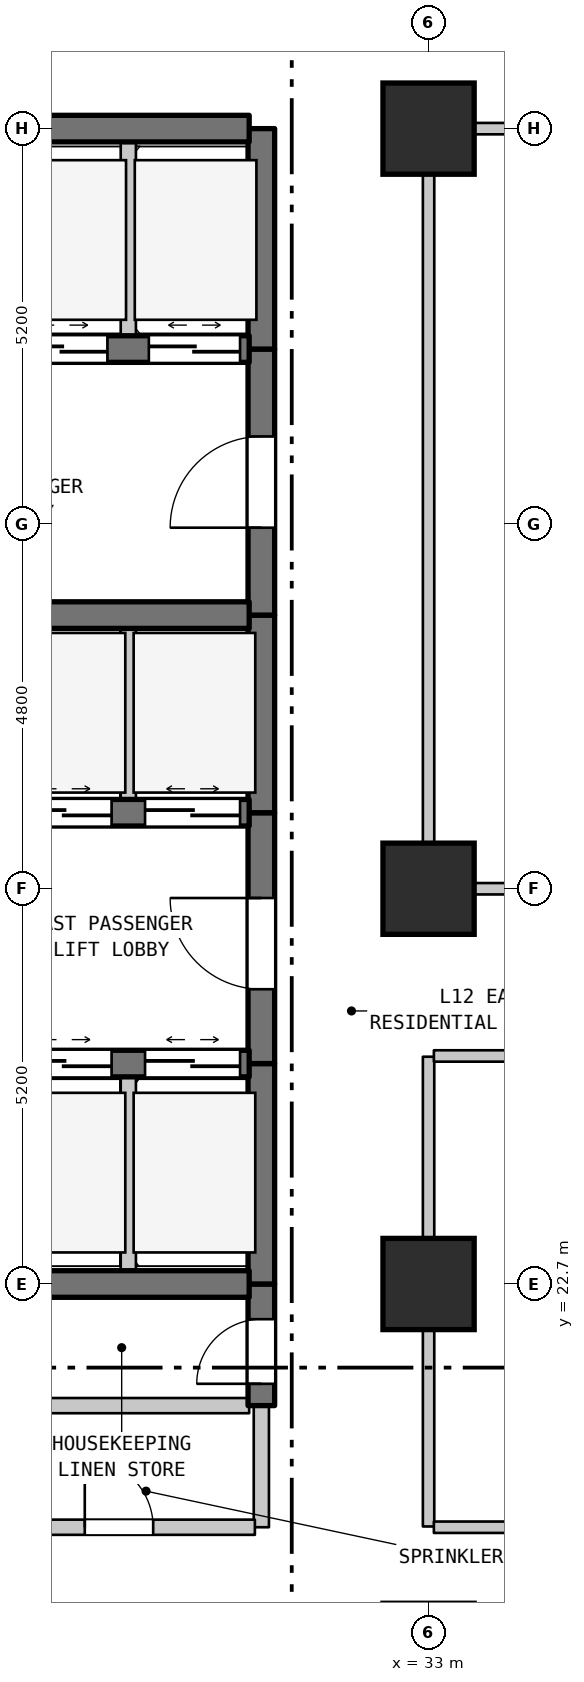
"""IFC4 building model, lengths in metres.
Left out: names, types, materials, properties, quantities, classifications, styles, units other than length and angle.
Written with IfcOpenShell. Run it as: python <this file> out.ifc"""

import sys

from ifc_helpers import new_model, si_unit, direction, frame, frame_2d, origin, origin_2d, place, context, subcontext, project, spatial, rectangle, extrude, element, fill, save


model = new_model("IFC4")
c1 = context("Model", 3, precision=1e-05, world=origin(), true_north=direction((0.0, 1.0)))
c2 = subcontext(c1, "Body", "Model", "MODEL_VIEW")
j1 = project(units=[si_unit("LENGTHUNIT", "METRE"), si_unit("PLANEANGLEUNIT", "RADIAN")], contexts=[c1])
p1 = place(None, origin())
s1 = spatial("IfcSite", under=j1, at=p1, CompositionType="ELEMENT")
p2 = place(p1, origin())
s2 = spatial("IfcBuilding", under=s1, at=p2, CompositionType="ELEMENT")
p3 = place(p2, frame((0.0, 0.0, 53.6)))
s3 = spatial("IfcBuildingStorey", under=s2, at=p3, CompositionType="ELEMENT", Elevation=53.6)
for number, where, z_axis, x_axis in (
    (1, (33.0, 22.7, 0.0), (0.0, 0.0, 1.0), (1.0, 0.0, 0.0)),
    (2, (33.0, 27.9, 0.0), (0.0, 0.0, 1.0), (1.0, 0.0, 0.0)),
    (3, (33.0, 37.9, 0.0), (0.0, 0.0, 1.0), (1.0, 0.0, 0.0)),
):
    element("IfcColumn", number, at=place(p3, frame(where, z_axis=z_axis, x_axis=x_axis)), inside=s3, PredefinedType="COLUMN", context=c2, shape_type="SweptSolid", body=[
        extrude(rectangle(XDim=1.2, YDim=1.2, at=origin_2d()), origin(), (0.0, 0.0, 1.0), 3.7),
    ])
p4 = place(p3, frame((29.05, 22.7, 0.0), z_axis=(0.0, 0.0, 1.0), x_axis=(0.0, 1.0, 0.0)))
e4 = element("IfcWall", 4, at=p4, inside=s3, PredefinedType="STANDARD", context=c2, shape_type="SweptSolid", body=[
    extrude(rectangle(XDim=2.9, YDim=0.2, at=frame_2d((1.45, 0.0))), origin(), (0.0, 0.0, 1.0), 3.385),
])
p5 = place(p3, frame((29.05, 28.9, 0.0), z_axis=(0.0, 0.0, 1.0), x_axis=(0.0, 1.0, 0.0)))
e5 = element("IfcWall", 5, at=p5, inside=s3, PredefinedType="STANDARD", context=c2, shape_type="SweptSolid", body=[
    extrude(rectangle(XDim=2.6, YDim=0.2, at=frame_2d((1.3, 0.0))), origin(), (0.0, 0.0, 1.0), 3.385),
])
p6 = place(p3, frame((29.05, 35.0, 0.0), z_axis=(0.0, 0.0, 1.0), x_axis=(0.0, 1.0, 0.0)))
e6 = element("IfcWall", 6, at=p6, inside=s3, PredefinedType="STANDARD", context=c2, shape_type="SweptSolid", body=[
    extrude(rectangle(XDim=2.9, YDim=0.2, at=frame_2d((1.45, 0.0))), origin(), (0.0, 0.0, 1.0), 3.385),
])
p7 = place(p3, frame((30.8, 19.5, 0.0), z_axis=(0.0, 0.0, 1.0), x_axis=(0.0, 1.0, 0.0)))
e7 = element("IfcWall", 7, at=p7, inside=s3, PredefinedType="STANDARD", context=c2, shape_type="SweptSolid", body=[
    extrude(rectangle(XDim=1.6, YDim=0.2, at=frame_2d((0.8, 0.0))), origin(), (0.0, 0.0, 1.0), 3.385),
])
p8 = place(p3, frame((30.8, 21.1, 0.0), z_axis=(0.0, 0.0, 1.0), x_axis=(0.0, 1.0, 0.0)))
e8 = element("IfcWall", 8, at=p8, inside=s3, PredefinedType="SHEAR", context=c2, shape_type="SweptSolid", body=[
    extrude(rectangle(XDim=1.6, YDim=0.35, at=frame_2d((0.8, 0.0))), origin(), (0.0, 0.0, 1.0), 3.385),
])
p9 = place(p8, frame((0.287, 0.0, 0.0)))
e9 = element("IfcOpeningElement", 9, at=p9, cuts=e8, PredefinedType="OPENING", context=c2, shape_type="SweptSolid", body=[
    extrude(rectangle(XDim=0.85, YDim=2.1, at=frame_2d((0.425, 1.05))), frame((0.0, 0.185, 0.0), z_axis=(0.0, -1.0, 0.0), x_axis=(1.0, 0.0, 0.0)), (0.0, 0.0, 1.0), 0.37),
])
p10 = place(p3, frame((30.8, 22.7, 0.0), z_axis=(0.0, 0.0, 1.0), x_axis=(0.0, 1.0, 0.0)))
e10 = element("IfcWall", 10, at=p10, inside=s3, PredefinedType="SHEAR", context=c2, shape_type="SweptSolid", body=[
    extrude(rectangle(XDim=2.9, YDim=0.35, at=frame_2d((1.45, 0.0))), origin(), (0.0, 0.0, 1.0), 3.385),
])
p11 = place(p3, frame((30.8, 25.6, 0.0), z_axis=(0.0, 0.0, 1.0), x_axis=(0.0, 1.0, 0.0)))
e11 = element("IfcWall", 11, at=p11, inside=s3, PredefinedType="SHEAR", context=c2, shape_type="SweptSolid", body=[
    extrude(rectangle(XDim=3.3, YDim=0.35, at=frame_2d((1.65, 0.0))), origin(), (0.0, 0.0, 1.0), 3.385),
])
p12 = place(p11, frame((0.978, 0.0, 0.0)))
e12 = element("IfcOpeningElement", 12, at=p12, cuts=e11, PredefinedType="OPENING", context=c2, shape_type="SweptSolid", body=[
    extrude(rectangle(XDim=1.2, YDim=2.2, at=frame_2d((0.6, 1.1))), frame((0.0, 0.185, 0.0), z_axis=(0.0, -1.0, 0.0), x_axis=(1.0, 0.0, 0.0)), (0.0, 0.0, 1.0), 0.37),
])
p13 = place(p3, frame((30.8, 28.9, 0.0), z_axis=(0.0, 0.0, 1.0), x_axis=(0.0, 1.0, 0.0)))
e13 = element("IfcWall", 13, at=p13, inside=s3, PredefinedType="SHEAR", context=c2, shape_type="SweptSolid", body=[
    extrude(rectangle(XDim=2.6, YDim=0.35, at=frame_2d((1.3, 0.0))), origin(), (0.0, 0.0, 1.0), 3.385),
])
p14 = place(p3, frame((30.8, 31.5, 0.0), z_axis=(0.0, 0.0, 1.0), x_axis=(0.0, 1.0, 0.0)))
e14 = element("IfcWall", 14, at=p14, inside=s3, PredefinedType="SHEAR", context=c2, shape_type="SweptSolid", body=[
    extrude(rectangle(XDim=3.5, YDim=0.35, at=frame_2d((1.75, 0.0))), origin(), (0.0, 0.0, 1.0), 3.385),
])
p15 = place(p14, frame((1.15, 0.0, 0.0)))
e15 = element("IfcOpeningElement", 15, at=p15, cuts=e14, PredefinedType="OPENING", context=c2, shape_type="SweptSolid", body=[
    extrude(rectangle(XDim=1.2, YDim=2.2, at=frame_2d((0.6, 1.1))), frame((0.0, 0.185, 0.0), z_axis=(0.0, -1.0, 0.0), x_axis=(1.0, 0.0, 0.0)), (0.0, 0.0, 1.0), 0.37),
])
p16 = place(p3, frame((30.8, 35.0, 0.0), z_axis=(0.0, 0.0, 1.0), x_axis=(0.0, 1.0, 0.0)))
e16 = element("IfcWall", 16, at=p16, inside=s3, PredefinedType="SHEAR", context=c2, shape_type="SweptSolid", body=[
    extrude(rectangle(XDim=2.9, YDim=0.35, at=frame_2d((1.45, 0.0))), origin(), (0.0, 0.0, 1.0), 3.385),
])
p17 = place(p3, frame((33.0, 19.51, 0.0), z_axis=(0.0, 0.0, 1.0), x_axis=(0.0, 1.0, 0.0)))
e17 = element("IfcWall", 17, at=p17, inside=s3, PredefinedType="STANDARD", context=c2, shape_type="SweptSolid", body=[
    extrude(rectangle(XDim=6.18, YDim=0.15, at=frame_2d((3.09, 0.0))), origin(), (0.0, 0.0, 1.0), 2.885),
])
p18 = place(p3, frame((33.0, 27.91, 0.0), z_axis=(0.0, 0.0, 1.0), x_axis=(0.0, 1.0, 0.0)))
e18 = element("IfcWall", 18, at=p18, inside=s3, PredefinedType="STANDARD", context=c2, shape_type="SweptSolid", body=[
    extrude(rectangle(XDim=9.98, YDim=0.15, at=frame_2d((4.99, 0.0))), origin(), (0.0, 0.0, 1.0), 2.885),
])
p19 = place(p3, frame((27.285, 19.5, 0.0), z_axis=(0.0, 0.0, 1.0), x_axis=(1.0, 0.0, 0.0)))
e19 = element("IfcWall", 19, at=p19, inside=s3, PredefinedType="STANDARD", context=c2, shape_type="SweptSolid", body=[
    extrude(rectangle(XDim=3.43, YDim=0.2, at=frame_2d((1.715, 0.0))), origin(), (0.0, 0.0, 1.0), 3.385),
])
p20 = place(p19, frame((1.192, 0.0, 0.0)))
e20 = element("IfcOpeningElement", 20, at=p20, cuts=e19, PredefinedType="OPENING", context=c2, shape_type="SweptSolid", body=[
    extrude(rectangle(XDim=0.9, YDim=2.15, at=frame_2d((0.45, 1.075))), frame((0.0, 0.11, 0.0), z_axis=(0.0, -1.0, 0.0), x_axis=(1.0, 0.0, 0.0)), (0.0, 0.0, 1.0), 0.22),
])
p21 = place(p3, frame((33.07, 19.5, 0.0), z_axis=(0.0, 0.0, 1.0), x_axis=(1.0, 0.0, 0.0)))
e21 = element("IfcWall", 21, at=p21, inside=s3, PredefinedType="STANDARD", context=c2, shape_type="SweptSolid", body=[
    extrude(rectangle(XDim=33.27, YDim=0.15, at=frame_2d((16.635, 0.0))), origin(), (0.0, 0.0, 1.0), 3.385),
])
p22 = place(p21, frame((16.065, 0.0, 0.0)))
e22 = element("IfcOpeningElement", 22, at=p22, cuts=e21, PredefinedType="OPENING", context=c2, shape_type="SweptSolid", body=[
    extrude(rectangle(XDim=1.0, YDim=2.15, at=frame_2d((0.5, 1.075))), frame((0.0, 0.085, 0.0), z_axis=(0.0, -1.0, 0.0), x_axis=(1.0, 0.0, 0.0)), (0.0, 0.0, 1.0), 0.17),
])
p23 = place(p3, frame((27.285, 21.1, 0.0), z_axis=(0.0, 0.0, 1.0), x_axis=(1.0, 0.0, 0.0)))
e23 = element("IfcWall", 23, at=p23, inside=s3, PredefinedType="STANDARD", context=c2, shape_type="SweptSolid", body=[
    extrude(rectangle(XDim=3.355, YDim=0.2, at=frame_2d((1.677, 0.0))), origin(), (0.0, 0.0, 1.0), 3.385),
])
p24 = place(p3, frame((27.46, 22.7, 0.0), z_axis=(0.0, 0.0, 1.0), x_axis=(1.0, 0.0, 0.0)))
e24 = element("IfcWall", 24, at=p24, inside=s3, PredefinedType="SHEAR", context=c2, shape_type="SweptSolid", body=[
    extrude(rectangle(XDim=3.18, YDim=0.35, at=frame_2d((1.59, 0.0))), origin(), (0.0, 0.0, 1.0), 3.385),
])
p25 = place(p3, frame((27.46, 25.6, 0.0), z_axis=(0.0, 0.0, 1.0), x_axis=(1.0, 0.0, 0.0)))
e25 = element("IfcWall", 25, at=p25, inside=s3, PredefinedType="SHEAR", context=c2, shape_type="SweptSolid", body=[
    extrude(rectangle(XDim=3.18, YDim=0.35, at=frame_2d((1.59, 0.0))), origin(), (0.0, 0.0, 1.0), 3.385),
])
p26 = place(p25, frame((0.12, 0.0, 0.0)))
e26 = element("IfcOpeningElement", 26, at=p26, cuts=e25, PredefinedType="OPENING", context=c2, shape_type="SweptSolid", body=[
    extrude(rectangle(XDim=1.25, YDim=2.2, at=frame_2d((0.625, 1.1))), frame((0.0, 0.185, 0.0), z_axis=(0.0, -1.0, 0.0), x_axis=(1.0, 0.0, 0.0)), (0.0, 0.0, 1.0), 0.37),
])
p27 = place(p25, frame((1.81, 0.0, 0.0)))
e27 = element("IfcOpeningElement", 27, at=p27, cuts=e25, PredefinedType="OPENING", context=c2, shape_type="SweptSolid", body=[
    extrude(rectangle(XDim=1.25, YDim=2.2, at=frame_2d((0.625, 1.1))), frame((0.0, 0.185, 0.0), z_axis=(0.0, -1.0, 0.0), x_axis=(1.0, 0.0, 0.0)), (0.0, 0.0, 1.0), 0.37),
])
p28 = place(p3, frame((33.07, 25.7, 0.0), z_axis=(0.0, 0.0, 1.0), x_axis=(1.0, 0.0, 0.0)))
e28 = element("IfcWall", 28, at=p28, inside=s3, PredefinedType="STANDARD", context=c2, shape_type="SweptSolid", body=[
    extrude(rectangle(XDim=30.87, YDim=0.15, at=frame_2d((15.435, 0.0))), origin(), (0.0, 0.0, 1.0), 3.385),
])
p29 = place(p3, frame((33.07, 27.9, 0.0), z_axis=(0.0, 0.0, 1.0), x_axis=(1.0, 0.0, 0.0)))
e29 = element("IfcWall", 29, at=p29, inside=s3, PredefinedType="STANDARD", context=c2, shape_type="SweptSolid", body=[
    extrude(rectangle(XDim=30.87, YDim=0.15, at=frame_2d((15.435, 0.0))), origin(), (0.0, 0.0, 1.0), 2.885),
])
p30 = place(p29, frame((14.935, 0.0, 0.0)))
e30 = element("IfcOpeningElement", 30, at=p30, cuts=e29, PredefinedType="OPENING", context=c2, shape_type="SweptSolid", body=[
    extrude(rectangle(XDim=1.0, YDim=2.15, at=frame_2d((0.5, 1.075))), frame((0.0, 0.085, 0.0), z_axis=(0.0, -1.0, 0.0), x_axis=(1.0, 0.0, 0.0)), (0.0, 0.0, 1.0), 0.17),
])
p31 = place(p3, frame((27.46, 28.9, 0.0), z_axis=(0.0, 0.0, 1.0), x_axis=(1.0, 0.0, 0.0)))
e31 = element("IfcWall", 31, at=p31, inside=s3, PredefinedType="SHEAR", context=c2, shape_type="SweptSolid", body=[
    extrude(rectangle(XDim=3.18, YDim=0.35, at=frame_2d((1.59, 0.0))), origin(), (0.0, 0.0, 1.0), 3.385),
])
p32 = place(p31, frame((0.12, 0.0, 0.0)))
e32 = element("IfcOpeningElement", 32, at=p32, cuts=e31, PredefinedType="OPENING", context=c2, shape_type="SweptSolid", body=[
    extrude(rectangle(XDim=1.25, YDim=2.2, at=frame_2d((0.625, 1.1))), frame((0.0, 0.185, 0.0), z_axis=(0.0, -1.0, 0.0), x_axis=(1.0, 0.0, 0.0)), (0.0, 0.0, 1.0), 0.37),
])
p33 = place(p31, frame((1.81, 0.0, 0.0)))
e33 = element("IfcOpeningElement", 33, at=p33, cuts=e31, PredefinedType="OPENING", context=c2, shape_type="SweptSolid", body=[
    extrude(rectangle(XDim=1.25, YDim=2.2, at=frame_2d((0.625, 1.1))), frame((0.0, 0.185, 0.0), z_axis=(0.0, -1.0, 0.0), x_axis=(1.0, 0.0, 0.0)), (0.0, 0.0, 1.0), 0.37),
])
p34 = place(p3, frame((27.46, 31.5, 0.0), z_axis=(0.0, 0.0, 1.0), x_axis=(1.0, 0.0, 0.0)))
e34 = element("IfcWall", 34, at=p34, inside=s3, PredefinedType="SHEAR", context=c2, shape_type="SweptSolid", body=[
    extrude(rectangle(XDim=3.18, YDim=0.35, at=frame_2d((1.59, 0.0))), origin(), (0.0, 0.0, 1.0), 3.385),
])
p35 = place(p3, frame((19.16, 35.0, 0.0), z_axis=(0.0, 0.0, 1.0), x_axis=(1.0, 0.0, 0.0)))
e35 = element("IfcWall", 35, at=p35, inside=s3, PredefinedType="SHEAR", context=c2, shape_type="SweptSolid", body=[
    extrude(rectangle(XDim=11.48, YDim=0.35, at=frame_2d((5.74, 0.0))), origin(), (0.0, 0.0, 1.0), 3.385),
])
p36 = place(p35, frame((0.365, 0.0, 0.0)))
e36 = element("IfcOpeningElement", 36, at=p36, cuts=e35, PredefinedType="OPENING", context=c2, shape_type="SweptSolid", body=[
    extrude(rectangle(XDim=1.35, YDim=2.2, at=frame_2d((0.675, 1.1))), frame((0.0, 0.185, 0.0), z_axis=(0.0, -1.0, 0.0), x_axis=(1.0, 0.0, 0.0)), (0.0, 0.0, 1.0), 0.37),
])
p37 = place(p35, frame((2.765, 0.0, 0.0)))
e37 = element("IfcOpeningElement", 37, at=p37, cuts=e35, PredefinedType="OPENING", context=c2, shape_type="SweptSolid", body=[
    extrude(rectangle(XDim=1.35, YDim=2.2, at=frame_2d((0.675, 1.1))), frame((0.0, 0.185, 0.0), z_axis=(0.0, -1.0, 0.0), x_axis=(1.0, 0.0, 0.0)), (0.0, 0.0, 1.0), 0.37),
])
p38 = place(p35, frame((4.915, 0.0, 0.0)))
e38 = element("IfcOpeningElement", 38, at=p38, cuts=e35, PredefinedType="OPENING", context=c2, shape_type="SweptSolid", body=[
    extrude(rectangle(XDim=1.2, YDim=2.2, at=frame_2d((0.6, 1.1))), frame((0.0, 0.185, 0.0), z_axis=(0.0, -1.0, 0.0), x_axis=(1.0, 0.0, 0.0)), (0.0, 0.0, 1.0), 0.37),
])
p39 = place(p35, frame((6.665, 0.0, 0.0)))
e39 = element("IfcOpeningElement", 39, at=p39, cuts=e35, PredefinedType="OPENING", context=c2, shape_type="SweptSolid", body=[
    extrude(rectangle(XDim=1.2, YDim=2.2, at=frame_2d((0.6, 1.1))), frame((0.0, 0.185, 0.0), z_axis=(0.0, -1.0, 0.0), x_axis=(1.0, 0.0, 0.0)), (0.0, 0.0, 1.0), 0.37),
])
p40 = place(p35, frame((8.415, 0.0, 0.0)))
e40 = element("IfcOpeningElement", 40, at=p40, cuts=e35, PredefinedType="OPENING", context=c2, shape_type="SweptSolid", body=[
    extrude(rectangle(XDim=1.2, YDim=2.2, at=frame_2d((0.6, 1.1))), frame((0.0, 0.185, 0.0), z_axis=(0.0, -1.0, 0.0), x_axis=(1.0, 0.0, 0.0)), (0.0, 0.0, 1.0), 0.37),
])
p41 = place(p35, frame((10.16, 0.0, 0.0)))
e41 = element("IfcOpeningElement", 41, at=p41, cuts=e35, PredefinedType="OPENING", context=c2, shape_type="SweptSolid", body=[
    extrude(rectangle(XDim=1.2, YDim=2.2, at=frame_2d((0.6, 1.1))), frame((0.0, 0.185, 0.0), z_axis=(0.0, -1.0, 0.0), x_axis=(1.0, 0.0, 0.0)), (0.0, 0.0, 1.0), 0.37),
])
p42 = place(p3, frame((19.16, 37.9, 0.0), z_axis=(0.0, 0.0, 1.0), x_axis=(1.0, 0.0, 0.0)))
e42 = element("IfcWall", 42, at=p42, inside=s3, PredefinedType="SHEAR", context=c2, shape_type="SweptSolid", body=[
    extrude(rectangle(XDim=11.48, YDim=0.35, at=frame_2d((5.74, 0.0))), origin(), (0.0, 0.0, 1.0), 3.385),
])
p43 = place(p3, frame((33.07, 37.9, 0.0), z_axis=(0.0, 0.0, 1.0), x_axis=(1.0, 0.0, 0.0)))
e43 = element("IfcWall", 43, at=p43, inside=s3, PredefinedType="STANDARD", context=c2, shape_type="SweptSolid", body=[
    extrude(rectangle(XDim=26.935, YDim=0.15, at=frame_2d((13.467, 0.0))), origin(), (0.0, 0.0, 1.0), 3.385),
])
p44 = place(p9, origin())
e44 = element("IfcDoor", 44, at=p44, inside=s3, OperationType="SINGLE_SWING_LEFT", PredefinedType="DOOR", context=c2, shape_type="SweptSolid", body=[
    extrude(rectangle(XDim=0.85, YDim=2.1, at=frame_2d((0.425, 1.05))), frame((0.0, 0.025, 0.0), z_axis=(0.0, -1.0, 0.0), x_axis=(1.0, 0.0, 0.0)), (0.0, 0.0, 1.0), 0.05),
])
fill(e9, e44)
p45 = place(p12, origin())
e45 = element("IfcDoor", 45, at=p45, inside=s3, OperationType="SINGLE_SWING_RIGHT", PredefinedType="DOOR", context=c2, shape_type="SweptSolid", body=[
    extrude(rectangle(XDim=1.2, YDim=2.2, at=frame_2d((0.6, 1.1))), frame((0.0, 0.025, 0.0), z_axis=(0.0, -1.0, 0.0), x_axis=(1.0, 0.0, 0.0)), (0.0, 0.0, 1.0), 0.05),
])
fill(e12, e45)
p46 = place(p15, origin())
e46 = element("IfcDoor", 46, at=p46, inside=s3, OperationType="SINGLE_SWING_LEFT", PredefinedType="DOOR", context=c2, shape_type="SweptSolid", body=[
    extrude(rectangle(XDim=1.2, YDim=2.2, at=frame_2d((0.6, 1.1))), frame((0.0, 0.025, 0.0), z_axis=(0.0, -1.0, 0.0), x_axis=(1.0, 0.0, 0.0)), (0.0, 0.0, 1.0), 0.05),
])
fill(e15, e46)
p47 = place(p20, origin())
e47 = element("IfcDoor", 47, at=p47, inside=s3, OperationType="SINGLE_SWING_LEFT", PredefinedType="DOOR", context=c2, shape_type="SweptSolid", body=[
    extrude(rectangle(XDim=0.9, YDim=2.15, at=frame_2d((0.45, 1.075))), frame((0.0, 0.025, 0.0), z_axis=(0.0, -1.0, 0.0), x_axis=(1.0, 0.0, 0.0)), (0.0, 0.0, 1.0), 0.05),
])
fill(e20, e47)
p48 = place(p26, origin())
e48 = element("IfcDoor", 48, at=p48, inside=s3, OperationType="DOUBLE_DOOR_SLIDING", PredefinedType="DOOR", context=c2, shape_type="SweptSolid", body=[
    extrude(rectangle(XDim=1.25, YDim=2.2, at=frame_2d((0.625, 1.1))), frame((0.0, 0.025, 0.0), z_axis=(0.0, -1.0, 0.0), x_axis=(1.0, 0.0, 0.0)), (0.0, 0.0, 1.0), 0.05),
])
fill(e26, e48)
p49 = place(p27, origin())
e49 = element("IfcDoor", 49, at=p49, inside=s3, OperationType="DOUBLE_DOOR_SLIDING", PredefinedType="DOOR", context=c2, shape_type="SweptSolid", body=[
    extrude(rectangle(XDim=1.25, YDim=2.2, at=frame_2d((0.625, 1.1))), frame((0.0, 0.025, 0.0), z_axis=(0.0, -1.0, 0.0), x_axis=(1.0, 0.0, 0.0)), (0.0, 0.0, 1.0), 0.05),
])
fill(e27, e49)
p50 = place(p32, origin())
e50 = element("IfcDoor", 50, at=p50, inside=s3, OperationType="DOUBLE_DOOR_SLIDING", PredefinedType="DOOR", context=c2, shape_type="SweptSolid", body=[
    extrude(rectangle(XDim=1.25, YDim=2.2, at=frame_2d((0.625, 1.1))), frame((0.0, 0.025, 0.0), z_axis=(0.0, -1.0, 0.0), x_axis=(1.0, 0.0, 0.0)), (0.0, 0.0, 1.0), 0.05),
])
fill(e32, e50)
p51 = place(p33, origin())
e51 = element("IfcDoor", 51, at=p51, inside=s3, OperationType="DOUBLE_DOOR_SLIDING", PredefinedType="DOOR", context=c2, shape_type="SweptSolid", body=[
    extrude(rectangle(XDim=1.25, YDim=2.2, at=frame_2d((0.625, 1.1))), frame((0.0, 0.025, 0.0), z_axis=(0.0, -1.0, 0.0), x_axis=(1.0, 0.0, 0.0)), (0.0, 0.0, 1.0), 0.05),
])
fill(e33, e51)
p52 = place(p40, origin())
e52 = element("IfcDoor", 52, at=p52, inside=s3, OperationType="DOUBLE_DOOR_SLIDING", PredefinedType="DOOR", context=c2, shape_type="SweptSolid", body=[
    extrude(rectangle(XDim=1.2, YDim=2.2, at=frame_2d((0.6, 1.1))), frame((0.0, 0.025, 0.0), z_axis=(0.0, -1.0, 0.0), x_axis=(1.0, 0.0, 0.0)), (0.0, 0.0, 1.0), 0.05),
])
fill(e40, e52)
p53 = place(p41, origin())
e53 = element("IfcDoor", 53, at=p53, inside=s3, OperationType="DOUBLE_DOOR_SLIDING", PredefinedType="DOOR", context=c2, shape_type="SweptSolid", body=[
    extrude(rectangle(XDim=1.2, YDim=2.2, at=frame_2d((0.6, 1.1))), frame((0.0, 0.025, 0.0), z_axis=(0.0, -1.0, 0.0), x_axis=(1.0, 0.0, 0.0)), (0.0, 0.0, 1.0), 0.05),
])
fill(e41, e53)
save(model, sys.argv[1])
